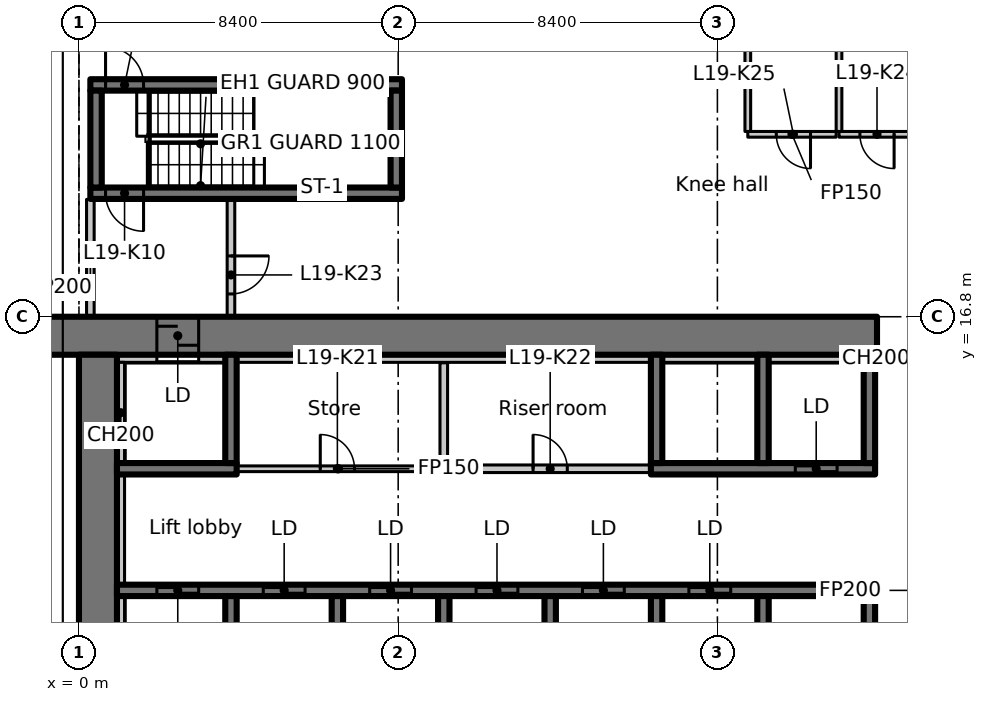
"""IFC4 building model, lengths in metres.
Left out: names, types, materials, properties, quantities, classifications, styles, units other than length and angle.
Written with IfcOpenShell. Run it as: python <this file> out.ifc"""

import sys

from ifc_helpers import new_model, si_unit, direction, frame, frame_2d, origin, place, context, subcontext, project, spatial, rectangle, extrude, element, fill, save


model = new_model("IFC4")
c1 = context("Model", 3, precision=1e-05, world=origin(), true_north=direction((0.0, 1.0)))
c2 = subcontext(c1, "Body", "Model", "MODEL_VIEW")
j1 = project(units=[si_unit("LENGTHUNIT", "METRE"), si_unit("PLANEANGLEUNIT", "RADIAN")], contexts=[c1])
p1 = place(None, origin())
s1 = spatial("IfcSite", under=j1, at=p1, CompositionType="ELEMENT")
p2 = place(p1, origin())
s2 = spatial("IfcBuilding", under=s1, at=p2, CompositionType="ELEMENT")
p3 = place(p2, frame((0.0, 0.0, 83.3)))
s3 = spatial("IfcBuildingStorey", under=s2, at=p3, CompositionType="ELEMENT", Elevation=83.3)
p4 = place(p3, frame((-1.1, 16.3, 0.0), z_axis=(0.0, 0.0, 1.0), x_axis=(1.0, 0.0, 0.0)))
e1 = element("IfcWall", 1, at=p4, inside=s3, PredefinedType="SHEAR", context=c2, shape_type="SweptSolid", body=[
    extrude(rectangle(XDim=22.1, YDim=1.0, at=frame_2d((11.05, 0.0))), origin(), (0.0, 0.0, 1.0), 3.3),
])
p5 = place(p4, frame((3.15, 0.0, 0.0)))
e2 = element("IfcOpeningElement", 2, at=p5, cuts=e1, PredefinedType="OPENING", context=c2, shape_type="SweptSolid", body=[
    extrude(rectangle(XDim=1.1, YDim=2.3, at=frame_2d((0.55, 1.15))), frame((0.0, 0.51, 0.0), z_axis=(0.0, -1.0, 0.0), x_axis=(1.0, 0.0, 0.0)), (0.0, 0.0, 1.0), 1.02),
])
p6 = place(p3, frame((0.5, 6.936, 0.0), z_axis=(0.0, 0.0, 1.0), x_axis=(0.0, 1.0, 0.0)))
e3 = element("IfcWall", 3, at=p6, inside=s3, PredefinedType="SHEAR", context=c2, shape_type="SweptSolid", body=[
    extrude(rectangle(XDim=8.864, YDim=1.0, at=frame_2d((4.432, 0.0))), origin(), (0.0, 0.0, 1.0), 3.3),
])
p7 = place(p3, frame((1.0, 15.7, 0.0), z_axis=(0.0, 0.0, 1.0), x_axis=(1.0, 0.0, 0.0)))
e4 = element("IfcWall", 4, at=p7, inside=s3, PredefinedType="PARTITIONING", context=c2, shape_type="SweptSolid", body=[
    extrude(rectangle(XDim=1.05, YDim=0.2, at=frame_2d((0.525, 0.0))), origin(), (0.0, 0.0, 1.0), 3.3),
])
p8 = place(p3, frame((1.0, 9.6, 0.0), z_axis=(0.0, 0.0, 1.0), x_axis=(1.0, 0.0, 0.0)))
e5 = element("IfcWall", 5, at=p8, inside=s3, PredefinedType="SHEAR", context=c2, shape_type="SweptSolid", body=[
    extrude(rectangle(XDim=19.95, YDim=0.3, at=frame_2d((9.975, 0.0))), origin(), (0.0, 0.0, 1.0), 3.3),
])
p9 = place(p8, frame((1.05, 0.0, 0.0)))
e6 = element("IfcOpeningElement", 6, at=p9, cuts=e5, PredefinedType="OPENING", context=c2, shape_type="SweptSolid", body=[
    extrude(rectangle(XDim=1.1, YDim=2.3, at=frame_2d((0.55, 1.15))), frame((0.0, 0.16, 0.0), z_axis=(0.0, -1.0, 0.0), x_axis=(1.0, 0.0, 0.0)), (0.0, 0.0, 1.0), 0.32),
])
p10 = place(p8, frame((3.85, 0.0, 0.0)))
e7 = element("IfcOpeningElement", 7, at=p10, cuts=e5, PredefinedType="OPENING", context=c2, shape_type="SweptSolid", body=[
    extrude(rectangle(XDim=1.1, YDim=2.3, at=frame_2d((0.55, 1.15))), frame((0.0, 0.16, 0.0), z_axis=(0.0, -1.0, 0.0), x_axis=(1.0, 0.0, 0.0)), (0.0, 0.0, 1.0), 0.32),
])
p11 = place(p8, frame((6.65, 0.0, 0.0)))
e8 = element("IfcOpeningElement", 8, at=p11, cuts=e5, PredefinedType="OPENING", context=c2, shape_type="SweptSolid", body=[
    extrude(rectangle(XDim=1.1, YDim=2.3, at=frame_2d((0.55, 1.15))), frame((0.0, 0.16, 0.0), z_axis=(0.0, -1.0, 0.0), x_axis=(1.0, 0.0, 0.0)), (0.0, 0.0, 1.0), 0.32),
])
p12 = place(p8, frame((9.45, 0.0, 0.0)))
e9 = element("IfcOpeningElement", 9, at=p12, cuts=e5, PredefinedType="OPENING", context=c2, shape_type="SweptSolid", body=[
    extrude(rectangle(XDim=1.1, YDim=2.3, at=frame_2d((0.55, 1.15))), frame((0.0, 0.16, 0.0), z_axis=(0.0, -1.0, 0.0), x_axis=(1.0, 0.0, 0.0)), (0.0, 0.0, 1.0), 0.32),
])
p13 = place(p8, frame((12.25, 0.0, 0.0)))
e10 = element("IfcOpeningElement", 10, at=p13, cuts=e5, PredefinedType="OPENING", context=c2, shape_type="SweptSolid", body=[
    extrude(rectangle(XDim=1.1, YDim=2.3, at=frame_2d((0.55, 1.15))), frame((0.0, 0.16, 0.0), z_axis=(0.0, -1.0, 0.0), x_axis=(1.0, 0.0, 0.0)), (0.0, 0.0, 1.0), 0.32),
])
p14 = place(p8, frame((15.05, 0.0, 0.0)))
e11 = element("IfcOpeningElement", 11, at=p14, cuts=e5, PredefinedType="OPENING", context=c2, shape_type="SweptSolid", body=[
    extrude(rectangle(XDim=1.1, YDim=2.3, at=frame_2d((0.55, 1.15))), frame((0.0, 0.16, 0.0), z_axis=(0.0, -1.0, 0.0), x_axis=(1.0, 0.0, 0.0)), (0.0, 0.0, 1.0), 0.32),
])
for number, where, z_axis, x_axis in (
    (12, (4.0, 7.15, 0.0), (0.0, 0.0, 1.0), (0.0, 1.0, 0.0)),
    (13, (6.8, 7.15, 0.0), (0.0, 0.0, 1.0), (0.0, 1.0, 0.0)),
    (14, (9.6, 7.15, 0.0), (0.0, 0.0, 1.0), (0.0, 1.0, 0.0)),
    (15, (12.4, 7.15, 0.0), (0.0, 0.0, 1.0), (0.0, 1.0, 0.0)),
    (16, (15.2, 7.15, 0.0), (0.0, 0.0, 1.0), (0.0, 1.0, 0.0)),
    (17, (18.0, 7.15, 0.0), (0.0, 0.0, 1.0), (0.0, 1.0, 0.0)),
    (18, (20.8, 7.15, 0.0), (0.0, 0.0, 1.0), (0.0, 1.0, 0.0)),
):
    element("IfcWall", number, at=place(p3, frame(where, z_axis=z_axis, x_axis=x_axis)), inside=s3, PredefinedType="SHEAR", context=c2, shape_type="SweptSolid", body=[
        extrude(rectangle(XDim=2.3, YDim=0.3, at=frame_2d((1.15, 0.0))), origin(), (0.0, 0.0, 1.0), 3.3),
    ])
p15 = place(p3, frame((1.0, 12.8, 0.0), z_axis=(0.0, 0.0, 1.0), x_axis=(1.0, 0.0, 0.0)))
e19 = element("IfcWall", 19, at=p15, inside=s3, PredefinedType="SHEAR", context=c2, shape_type="SweptSolid", body=[
    extrude(rectangle(XDim=3.15, YDim=0.3, at=frame_2d((1.575, 0.0))), origin(), (0.0, 0.0, 1.0), 3.3),
])
p16 = place(p3, frame((4.0, 12.95, 0.0), z_axis=(0.0, 0.0, 1.0), x_axis=(0.0, 1.0, 0.0)))
e20 = element("IfcWall", 20, at=p16, inside=s3, PredefinedType="SHEAR", context=c2, shape_type="SweptSolid", body=[
    extrude(rectangle(XDim=2.85, YDim=0.3, at=frame_2d((1.425, 0.0))), origin(), (0.0, 0.0, 1.0), 3.3),
])
p17 = place(p3, frame((15.05, 12.8, 0.0), z_axis=(0.0, 0.0, 1.0), x_axis=(1.0, 0.0, 0.0)))
e21 = element("IfcWall", 21, at=p17, inside=s3, PredefinedType="SHEAR", context=c2, shape_type="SweptSolid", body=[
    extrude(rectangle(XDim=5.9, YDim=0.3, at=frame_2d((2.95, 0.0))), origin(), (0.0, 0.0, 1.0), 3.3),
])
p18 = place(p17, frame((3.8, 0.0, 0.0)))
e22 = element("IfcOpeningElement", 22, at=p18, cuts=e21, PredefinedType="OPENING", context=c2, shape_type="SweptSolid", body=[
    extrude(rectangle(XDim=1.1, YDim=2.3, at=frame_2d((0.55, 1.15))), frame((0.0, 0.16, 0.0), z_axis=(0.0, -1.0, 0.0), x_axis=(1.0, 0.0, 0.0)), (0.0, 0.0, 1.0), 0.32),
])
for number, where, z_axis, x_axis in (
    (23, (15.2, 12.95, 0.0), (0.0, 0.0, 1.0), (0.0, 1.0, 0.0)),
    (24, (18.0, 12.95, 0.0), (0.0, 0.0, 1.0), (0.0, 1.0, 0.0)),
    (25, (20.8, 12.95, 0.0), (0.0, 0.0, 1.0), (0.0, 1.0, 0.0)),
):
    element("IfcWall", number, at=place(p3, frame(where, z_axis=z_axis, x_axis=x_axis)), inside=s3, PredefinedType="SHEAR", context=c2, shape_type="SweptSolid", body=[
        extrude(rectangle(XDim=2.85, YDim=0.3, at=frame_2d((1.425, 0.0))), origin(), (0.0, 0.0, 1.0), 3.3),
    ])
p19 = place(p3, frame((8.5, 20.05, 0.0), z_axis=(0.0, 0.0, 1.0), x_axis=(-1.0, 0.0, 0.0)))
e26 = element("IfcWall", 26, at=p19, inside=s3, PredefinedType="SHEAR", context=c2, shape_type="SweptSolid", body=[
    extrude(rectangle(XDim=8.2, YDim=0.3, at=frame_2d((4.1, 0.0))), origin(), (0.0, 0.0, 1.0), 3.3),
])
p20 = place(p19, frame((6.8, 0.0, 0.0)))
e27 = element("IfcOpeningElement", 27, at=p20, cuts=e26, PredefinedType="OPENING", context=c2, shape_type="SweptSolid", body=[
    extrude(rectangle(XDim=1.0, YDim=2.1, at=frame_2d((0.5, 1.05))), frame((0.0, 0.16, 0.0), z_axis=(0.0, -1.0, 0.0), x_axis=(1.0, 0.0, 0.0)), (0.0, 0.0, 1.0), 0.32),
])
p21 = place(p3, frame((0.3, 22.9, 0.0), z_axis=(0.0, 0.0, 1.0), x_axis=(1.0, 0.0, 0.0)))
e28 = element("IfcWall", 28, at=p21, inside=s3, PredefinedType="SHEAR", context=c2, shape_type="SweptSolid", body=[
    extrude(rectangle(XDim=8.2, YDim=0.3, at=frame_2d((4.1, 0.0))), origin(), (0.0, 0.0, 1.0), 3.3),
])
p22 = place(p21, frame((0.4, 0.0, 0.0)))
e29 = element("IfcOpeningElement", 29, at=p22, cuts=e28, PredefinedType="OPENING", context=c2, shape_type="SweptSolid", body=[
    extrude(rectangle(XDim=1.0, YDim=2.1, at=frame_2d((0.5, 1.05))), frame((0.0, 0.16, 0.0), z_axis=(0.0, -1.0, 0.0), x_axis=(1.0, 0.0, 0.0)), (0.0, 0.0, 1.0), 0.32),
])
for number, where, z_axis, x_axis in (
    (30, (0.45, 20.2, 0.0), (0.0, 0.0, 1.0), (0.0, 1.0, 0.0)),
    (31, (8.35, 20.2, 0.0), (0.0, 0.0, 1.0), (0.0, 1.0, 0.0)),
):
    element("IfcWall", number, at=place(p3, frame(where, z_axis=z_axis, x_axis=x_axis)), inside=s3, PredefinedType="SHEAR", context=c2, shape_type="SweptSolid", body=[
        extrude(rectangle(XDim=2.55, YDim=0.3, at=frame_2d((1.275, 0.0))), origin(), (0.0, 0.0, 1.0), 3.3),
    ])
p23 = place(p3, frame((0.3, 16.812, 0.0), z_axis=(0.0, 0.0, 1.0), x_axis=(0.0, 1.0, 0.0)))
e32 = element("IfcWall", 32, at=p23, inside=s3, PredefinedType="PARTITIONING", context=c2, shape_type="SweptSolid", body=[
    extrude(rectangle(XDim=3.076, YDim=0.2, at=frame_2d((1.538, 0.0))), origin(), (0.0, 0.0, 1.0), 2.93),
])
p24 = place(p3, frame((4.0, 19.888, 0.0), z_axis=(0.0, 0.0, 1.0), x_axis=(0.0, -1.0, 0.0)))
e33 = element("IfcWall", 33, at=p24, inside=s3, PredefinedType="PARTITIONING", context=c2, shape_type="SweptSolid", body=[
    extrude(rectangle(XDim=3.076, YDim=0.2, at=frame_2d((1.538, 0.0))), origin(), (0.0, 0.0, 1.0), 3.3),
])
p25 = place(p24, frame((1.488, 0.0, 0.0)))
e34 = element("IfcOpeningElement", 34, at=p25, cuts=e33, PredefinedType="OPENING", context=c2, shape_type="SweptSolid", body=[
    extrude(rectangle(XDim=1.0, YDim=2.1, at=frame_2d((0.5, 1.05))), frame((0.0, 0.11, 0.0), z_axis=(0.0, -1.0, 0.0), x_axis=(1.0, 0.0, 0.0)), (0.0, 0.0, 1.0), 0.22),
])
p26 = place(p3, frame((9.6, 15.588, 0.0), z_axis=(0.0, 0.0, 1.0), x_axis=(0.0, -1.0, 0.0)))
e35 = element("IfcWall", 35, at=p26, inside=s3, PredefinedType="PARTITIONING", context=c2, shape_type="SweptSolid", body=[
    extrude(rectangle(XDim=2.788, YDim=0.2, at=frame_2d((1.394, 0.0))), origin(), (0.0, 0.0, 1.0), 3.3),
])
p27 = place(p3, frame((9.7, 12.8, 0.0), z_axis=(0.0, 0.0, 1.0), x_axis=(1.0, 0.0, 0.0)))
e36 = element("IfcWall", 36, at=p27, inside=s3, PredefinedType="PARTITIONING", context=c2, shape_type="SweptSolid", body=[
    extrude(rectangle(XDim=5.338, YDim=0.2, at=frame_2d((2.669, 0.0))), origin(), (0.0, 0.0, 1.0), 3.3),
])
p28 = place(p27, frame((2.25, 0.0, 0.0)))
e37 = element("IfcOpeningElement", 37, at=p28, cuts=e36, PredefinedType="OPENING", context=c2, shape_type="SweptSolid", body=[
    extrude(rectangle(XDim=0.9, YDim=2.1, at=frame_2d((0.45, 1.05))), frame((0.0, 0.11, 0.0), z_axis=(0.0, -1.0, 0.0), x_axis=(1.0, 0.0, 0.0)), (0.0, 0.0, 1.0), 0.22),
])
p29 = place(p3, frame((4.162, 12.8, 0.0), z_axis=(0.0, 0.0, 1.0), x_axis=(1.0, 0.0, 0.0)))
e38 = element("IfcWall", 38, at=p29, inside=s3, PredefinedType="PARTITIONING", context=c2, shape_type="SweptSolid", body=[
    extrude(rectangle(XDim=5.338, YDim=0.15, at=frame_2d((2.669, 0.0))), origin(), (0.0, 0.0, 1.0), 3.3),
])
p30 = place(p29, frame((2.188, 0.0, 0.0)))
e39 = element("IfcOpeningElement", 39, at=p30, cuts=e38, PredefinedType="OPENING", context=c2, shape_type="SweptSolid", body=[
    extrude(rectangle(XDim=0.9, YDim=2.1, at=frame_2d((0.45, 1.05))), frame((0.0, 0.085, 0.0), z_axis=(0.0, -1.0, 0.0), x_axis=(1.0, 0.0, 0.0)), (0.0, 0.0, 1.0), 0.17),
])
p31 = place(p3, frame((21.925, 21.6, 0.0), z_axis=(0.0, 0.0, 1.0), x_axis=(-1.0, 0.0, 0.0)))
e40 = element("IfcWall", 40, at=p31, inside=s3, PredefinedType="PARTITIONING", context=c2, shape_type="SweptSolid", body=[
    extrude(rectangle(XDim=1.925, YDim=0.15, at=frame_2d((0.962, 0.0))), origin(), (0.0, 0.0, 1.0), 3.3),
])
p32 = place(p31, frame((0.475, 0.0, 0.0)))
e41 = element("IfcOpeningElement", 41, at=p32, cuts=e40, PredefinedType="OPENING", context=c2, shape_type="SweptSolid", body=[
    extrude(rectangle(XDim=0.9, YDim=2.1, at=frame_2d((0.45, 1.05))), frame((0.0, 0.085, 0.0), z_axis=(0.0, -1.0, 0.0), x_axis=(1.0, 0.0, 0.0)), (0.0, 0.0, 1.0), 0.17),
])
p33 = place(p3, frame((20.0, 21.675, 0.0), z_axis=(0.0, 0.0, 1.0), x_axis=(0.0, 1.0, 0.0)))
e42 = element("IfcWall", 42, at=p33, inside=s3, PredefinedType="PARTITIONING", context=c2, shape_type="SweptSolid", body=[
    extrude(rectangle(XDim=2.25, YDim=0.15, at=frame_2d((1.125, 0.0))), origin(), (0.0, 0.0, 1.0), 3.3),
])
p34 = place(p3, frame((19.925, 21.6, 0.0), z_axis=(0.0, 0.0, 1.0), x_axis=(-1.0, 0.0, 0.0)))
e43 = element("IfcWall", 43, at=p34, inside=s3, PredefinedType="PARTITIONING", context=c2, shape_type="SweptSolid", body=[
    extrude(rectangle(XDim=2.325, YDim=0.15, at=frame_2d((1.163, 0.0))), origin(), (0.0, 0.0, 1.0), 3.3),
])
p35 = place(p34, frame((0.675, 0.0, 0.0)))
e44 = element("IfcOpeningElement", 44, at=p35, cuts=e43, PredefinedType="OPENING", context=c2, shape_type="SweptSolid", body=[
    extrude(rectangle(XDim=0.9, YDim=2.1, at=frame_2d((0.45, 1.05))), frame((0.0, 0.085, 0.0), z_axis=(0.0, -1.0, 0.0), x_axis=(1.0, 0.0, 0.0)), (0.0, 0.0, 1.0), 0.17),
])
p36 = place(p3, frame((17.6, 21.675, 0.0), z_axis=(0.0, 0.0, 1.0), x_axis=(0.0, 1.0, 0.0)))
e45 = element("IfcWall", 45, at=p36, inside=s3, PredefinedType="PARTITIONING", context=c2, shape_type="SweptSolid", body=[
    extrude(rectangle(XDim=2.325, YDim=0.15, at=frame_2d((1.163, 0.0))), origin(), (0.0, 0.0, 1.0), 3.3),
])
p37 = place(p3, frame((1.1, 7.15, 0.0), z_axis=(0.0, 0.0, 1.0), x_axis=(0.0, 1.0, 0.0)))
e46 = element("IfcWall", 46, at=p37, inside=s3, PredefinedType="PARTITIONING", context=c2, shape_type="SweptSolid", body=[
    extrude(rectangle(XDim=2.3, YDim=0.2, at=frame_2d((1.15, 0.0))), origin(), (0.0, 0.0, 1.0), 3.3),
])
p38 = place(p3, frame((1.1, 9.75, 0.0), z_axis=(0.0, 0.0, 1.0), x_axis=(0.0, 1.0, 0.0)))
e47 = element("IfcWall", 47, at=p38, inside=s3, PredefinedType="PARTITIONING", context=c2, shape_type="SweptSolid", body=[
    extrude(rectangle(XDim=2.9, YDim=0.2, at=frame_2d((1.45, 0.0))), origin(), (0.0, 0.0, 1.0), 3.3),
])
p39 = place(p3, frame((1.1, 12.95, 0.0), z_axis=(0.0, 0.0, 1.0), x_axis=(0.0, 1.0, 0.0)))
e48 = element("IfcWall", 48, at=p39, inside=s3, PredefinedType="PARTITIONING", context=c2, shape_type="SweptSolid", body=[
    extrude(rectangle(XDim=2.65, YDim=0.2, at=frame_2d((1.325, 0.0))), origin(), (0.0, 0.0, 1.0), 3.3),
])
p40 = place(p3, frame((3.15, 15.7, 0.0), z_axis=(0.0, 0.0, 1.0), x_axis=(1.0, 0.0, 0.0)))
e49 = element("IfcWall", 49, at=p40, inside=s3, PredefinedType="PARTITIONING", context=c2, shape_type="SweptSolid", body=[
    extrude(rectangle(XDim=0.7, YDim=0.2, at=frame_2d((0.35, 0.0))), origin(), (0.0, 0.0, 1.0), 3.3),
])
p41 = place(p3, frame((4.15, 15.7, 0.0), z_axis=(0.0, 0.0, 1.0), x_axis=(1.0, 0.0, 0.0)))
e50 = element("IfcWall", 50, at=p41, inside=s3, PredefinedType="PARTITIONING", context=c2, shape_type="SweptSolid", body=[
    extrude(rectangle(XDim=10.9, YDim=0.2, at=frame_2d((5.45, 0.0))), origin(), (0.0, 0.0, 1.0), 3.3),
])
for number, where, z_axis, x_axis in (
    (51, (15.35, 15.7, 0.0), (0.0, 0.0, 1.0), (1.0, 0.0, 0.0)),
    (52, (18.15, 15.7, 0.0), (0.0, 0.0, 1.0), (1.0, 0.0, 0.0)),
):
    element("IfcWall", number, at=place(p3, frame(where, z_axis=z_axis, x_axis=x_axis)), inside=s3, PredefinedType="PARTITIONING", context=c2, shape_type="SweptSolid", body=[
        extrude(rectangle(XDim=2.5, YDim=0.2, at=frame_2d((1.25, 0.0))), origin(), (0.0, 0.0, 1.0), 3.3),
    ])
p42 = place(p3, frame((20.95, 15.7, 0.0), z_axis=(0.0, 0.0, 1.0), x_axis=(1.0, 0.0, 0.0)))
e53 = element("IfcWall", 53, at=p42, inside=s3, PredefinedType="PARTITIONING", context=c2, shape_type="SweptSolid", body=[
    extrude(rectangle(XDim=0.05, YDim=0.2, at=frame_2d((0.025, 0.0))), origin(), (0.0, 0.0, 1.0), 3.3),
])
p43 = place(p9, origin())
e54 = element("IfcDoor", 54, at=p43, inside=s3, OperationType="SLIDING_TO_LEFT", PredefinedType="DOOR", context=c2, shape_type="SweptSolid", body=[
    extrude(rectangle(XDim=1.1, YDim=2.3, at=frame_2d((0.55, 1.15))), frame((0.0, 0.025, 0.0), z_axis=(0.0, -1.0, 0.0), x_axis=(1.0, 0.0, 0.0)), (0.0, 0.0, 1.0), 0.05),
])
fill(e6, e54)
p44 = place(p10, origin())
e55 = element("IfcDoor", 55, at=p44, inside=s3, OperationType="SLIDING_TO_LEFT", PredefinedType="DOOR", context=c2, shape_type="SweptSolid", body=[
    extrude(rectangle(XDim=1.1, YDim=2.3, at=frame_2d((0.55, 1.15))), frame((0.0, 0.025, 0.0), z_axis=(0.0, -1.0, 0.0), x_axis=(1.0, 0.0, 0.0)), (0.0, 0.0, 1.0), 0.05),
])
fill(e7, e55)
p45 = place(p11, origin())
e56 = element("IfcDoor", 56, at=p45, inside=s3, OperationType="SLIDING_TO_LEFT", PredefinedType="DOOR", context=c2, shape_type="SweptSolid", body=[
    extrude(rectangle(XDim=1.1, YDim=2.3, at=frame_2d((0.55, 1.15))), frame((0.0, 0.025, 0.0), z_axis=(0.0, -1.0, 0.0), x_axis=(1.0, 0.0, 0.0)), (0.0, 0.0, 1.0), 0.05),
])
fill(e8, e56)
p46 = place(p12, origin())
e57 = element("IfcDoor", 57, at=p46, inside=s3, OperationType="SLIDING_TO_LEFT", PredefinedType="DOOR", context=c2, shape_type="SweptSolid", body=[
    extrude(rectangle(XDim=1.1, YDim=2.3, at=frame_2d((0.55, 1.15))), frame((0.0, 0.025, 0.0), z_axis=(0.0, -1.0, 0.0), x_axis=(1.0, 0.0, 0.0)), (0.0, 0.0, 1.0), 0.05),
])
fill(e9, e57)
p47 = place(p13, origin())
e58 = element("IfcDoor", 58, at=p47, inside=s3, OperationType="SLIDING_TO_LEFT", PredefinedType="DOOR", context=c2, shape_type="SweptSolid", body=[
    extrude(rectangle(XDim=1.1, YDim=2.3, at=frame_2d((0.55, 1.15))), frame((0.0, 0.025, 0.0), z_axis=(0.0, -1.0, 0.0), x_axis=(1.0, 0.0, 0.0)), (0.0, 0.0, 1.0), 0.05),
])
fill(e10, e58)
p48 = place(p14, origin())
e59 = element("IfcDoor", 59, at=p48, inside=s3, OperationType="SLIDING_TO_LEFT", PredefinedType="DOOR", context=c2, shape_type="SweptSolid", body=[
    extrude(rectangle(XDim=1.1, YDim=2.3, at=frame_2d((0.55, 1.15))), frame((0.0, 0.025, 0.0), z_axis=(0.0, -1.0, 0.0), x_axis=(1.0, 0.0, 0.0)), (0.0, 0.0, 1.0), 0.05),
])
fill(e11, e59)
p49 = place(p5, origin())
e60 = element("IfcDoor", 60, at=p49, inside=s3, OperationType="SLIDING_TO_LEFT", PredefinedType="DOOR", context=c2, shape_type="SweptSolid", body=[
    extrude(rectangle(XDim=1.1, YDim=2.3, at=frame_2d((0.55, 1.15))), frame((0.0, 0.025, 0.0), z_axis=(0.0, -1.0, 0.0), x_axis=(1.0, 0.0, 0.0)), (0.0, 0.0, 1.0), 0.05),
])
fill(e2, e60)
p50 = place(p18, origin())
e61 = element("IfcDoor", 61, at=p50, inside=s3, OperationType="SLIDING_TO_LEFT", PredefinedType="DOOR", context=c2, shape_type="SweptSolid", body=[
    extrude(rectangle(XDim=1.1, YDim=2.3, at=frame_2d((0.55, 1.15))), frame((0.0, 0.025, 0.0), z_axis=(0.0, -1.0, 0.0), x_axis=(1.0, 0.0, 0.0)), (0.0, 0.0, 1.0), 0.05),
])
fill(e22, e61)
p51 = place(p20, origin())
e62 = element("IfcDoor", 62, at=p51, inside=s3, OperationType="SINGLE_SWING_RIGHT", PredefinedType="DOOR", context=c2, shape_type="SweptSolid", body=[
    extrude(rectangle(XDim=1.0, YDim=2.1, at=frame_2d((0.5, 1.05))), frame((0.0, 0.025, 0.0), z_axis=(0.0, -1.0, 0.0), x_axis=(1.0, 0.0, 0.0)), (0.0, 0.0, 1.0), 0.05),
])
fill(e27, e62)
p52 = place(p22, origin())
e63 = element("IfcDoor", 63, at=p52, inside=s3, OperationType="SINGLE_SWING_LEFT", PredefinedType="DOOR", context=c2, shape_type="SweptSolid", body=[
    extrude(rectangle(XDim=1.0, YDim=2.1, at=frame_2d((0.5, 1.05))), frame((0.0, 0.025, 0.0), z_axis=(0.0, -1.0, 0.0), x_axis=(1.0, 0.0, 0.0)), (0.0, 0.0, 1.0), 0.05),
])
fill(e29, e63)
p53 = place(p30, origin())
e64 = element("IfcDoor", 64, at=p53, inside=s3, OperationType="SINGLE_SWING_LEFT", PredefinedType="DOOR", context=c2, shape_type="SweptSolid", body=[
    extrude(rectangle(XDim=0.9, YDim=2.1, at=frame_2d((0.45, 1.05))), frame((0.0, 0.025, 0.0), z_axis=(0.0, -1.0, 0.0), x_axis=(1.0, 0.0, 0.0)), (0.0, 0.0, 1.0), 0.05),
])
fill(e39, e64)
p54 = place(p28, origin())
e65 = element("IfcDoor", 65, at=p54, inside=s3, OperationType="SINGLE_SWING_RIGHT", PredefinedType="DOOR", context=c2, shape_type="SweptSolid", body=[
    extrude(rectangle(XDim=0.9, YDim=2.1, at=frame_2d((0.45, 1.05))), frame((0.0, 0.025, 0.0), z_axis=(0.0, -1.0, 0.0), x_axis=(1.0, 0.0, 0.0)), (0.0, 0.0, 1.0), 0.05),
])
fill(e37, e65)
p55 = place(p25, origin())
e66 = element("IfcDoor", 66, at=p55, inside=s3, OperationType="SINGLE_SWING_LEFT", PredefinedType="DOOR", context=c2, shape_type="SweptSolid", body=[
    extrude(rectangle(XDim=1.0, YDim=2.1, at=frame_2d((0.5, 1.05))), frame((0.0, 0.025, 0.0), z_axis=(0.0, -1.0, 0.0), x_axis=(1.0, 0.0, 0.0)), (0.0, 0.0, 1.0), 0.05),
])
fill(e34, e66)
p56 = place(p32, origin())
e67 = element("IfcDoor", 67, at=p56, inside=s3, OperationType="SINGLE_SWING_RIGHT", PredefinedType="DOOR", context=c2, shape_type="SweptSolid", body=[
    extrude(rectangle(XDim=0.9, YDim=2.1, at=frame_2d((0.45, 1.05))), frame((0.0, 0.025, 0.0), z_axis=(0.0, -1.0, 0.0), x_axis=(1.0, 0.0, 0.0)), (0.0, 0.0, 1.0), 0.05),
])
fill(e41, e67)
p57 = place(p35, origin())
e68 = element("IfcDoor", 68, at=p57, inside=s3, OperationType="SINGLE_SWING_LEFT", PredefinedType="DOOR", context=c2, shape_type="SweptSolid", body=[
    extrude(rectangle(XDim=0.9, YDim=2.1, at=frame_2d((0.45, 1.05))), frame((0.0, 0.025, 0.0), z_axis=(0.0, -1.0, 0.0), x_axis=(1.0, 0.0, 0.0)), (0.0, 0.0, 1.0), 0.05),
])
fill(e44, e68)
save(model, sys.argv[1])
